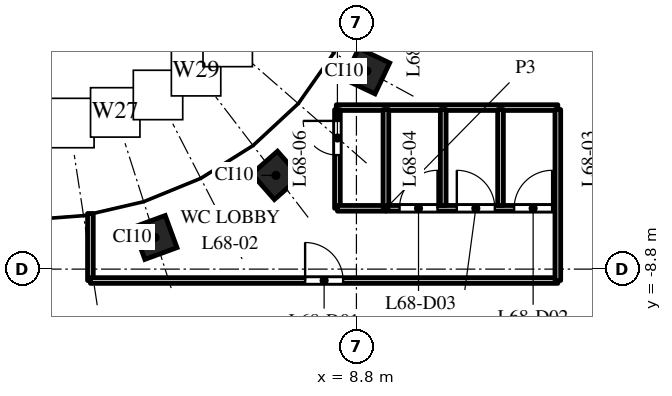
"""IFC4 building model, lengths in metres.
Left out: names, types, materials, properties, quantities, classifications, styles, units other than length and angle.
Written with IfcOpenShell. Run it as: python <this file> out.ifc"""

import sys

from ifc_helpers import new_model, si_unit, direction, frame, frame_2d, origin, origin_2d, place, context, subcontext, project, spatial, rectangle, extrude, element, fill, save


model = new_model("IFC4")
c1 = context("Model", 3, precision=1e-05, world=origin(), true_north=direction((0.0, 1.0)))
c2 = subcontext(c1, "Body", "Model", "MODEL_VIEW")
j1 = project(units=[si_unit("LENGTHUNIT", "METRE"), si_unit("PLANEANGLEUNIT", "RADIAN")], contexts=[c1])
p1 = place(None, origin())
s1 = spatial("IfcSite", under=j1, at=p1, CompositionType="ELEMENT")
p2 = place(p1, origin())
s2 = spatial("IfcBuilding", under=s1, at=p2, CompositionType="ELEMENT")
p3 = place(p2, frame((0.0, 0.0, 315.0)))
s3 = spatial("IfcBuildingStorey", under=s2, at=p3, CompositionType="ELEMENT", Elevation=315.0)
for number, where, z_axis, x_axis in (
    (1, (3.501, -7.967, 0.0), (0.0, 0.0, 1.0), (0.939, 0.344, 0.0)),
    (2, (6.682, -6.334, 0.0), (0.0, 0.0, 1.0), (0.751, 0.66, 0.0)),
    (3, (9.076, -3.588, 0.0), (0.0, 0.0, 1.0), (0.429, 0.903, 0.0)),
):
    element("IfcColumn", number, at=place(p3, frame(where, z_axis=z_axis, x_axis=x_axis)), inside=s3, PredefinedType="COLUMN", context=c2, shape_type="SweptSolid", body=[
        extrude(rectangle(XDim=0.9, YDim=0.9, at=origin_2d()), origin(), (0.0, 0.0, 1.0), 4.0),
    ])
p4 = place(p3, frame((1.8, -9.1, 0.0), z_axis=(0.0, 0.0, 1.0), x_axis=(0.0, 1.0, 0.0)))
e4 = element("IfcWall", 4, at=p4, inside=s3, PredefinedType="PARTITIONING", context=c2, shape_type="SweptSolid", body=[
    extrude(rectangle(XDim=1.764, YDim=0.15, at=frame_2d((0.882, 0.0))), origin(), (0.0, 0.0, 1.0), 3.0),
])
p5 = place(p3, frame((1.8, -9.1, 0.0), z_axis=(0.0, 0.0, 1.0), x_axis=(1.0, 0.0, 0.0)))
e5 = element("IfcWall", 5, at=p5, inside=s3, PredefinedType="PARTITIONING", context=c2, shape_type="SweptSolid", body=[
    extrude(rectangle(XDim=12.3, YDim=0.15, at=frame_2d((6.15, 0.0))), origin(), (0.0, 0.0, 1.0), 2.85),
])
p6 = place(p5, frame((5.65, 0.0, 0.0)))
e6 = element("IfcOpeningElement", 6, at=p6, cuts=e5, PredefinedType="OPENING", context=c2, shape_type="SweptSolid", body=[
    extrude(rectangle(XDim=1.0, YDim=2.1, at=frame_2d((0.5, 1.05))), frame((0.0, 0.085, 0.0), z_axis=(0.0, -1.0, 0.0), x_axis=(1.0, 0.0, 0.0)), (0.0, 0.0, 1.0), 0.17),
])
p7 = place(p3, frame((8.271, -4.55, 0.0), z_axis=(0.0, 0.0, 1.0), x_axis=(1.0, 0.0, 0.0)))
e7 = element("IfcWall", 7, at=p7, inside=s3, PredefinedType="PARTITIONING", context=c2, shape_type="SweptSolid", body=[
    extrude(rectangle(XDim=5.829, YDim=0.15, at=frame_2d((2.915, 0.0))), origin(), (0.0, 0.0, 1.0), 2.75),
])
p8 = place(p3, frame((8.3, -7.2, 0.0), z_axis=(0.0, 0.0, 1.0), x_axis=(0.0, 1.0, 0.0)))
e8 = element("IfcWall", 8, at=p8, inside=s3, PredefinedType="PARTITIONING", context=c2, shape_type="SweptSolid", body=[
    extrude(rectangle(XDim=2.596, YDim=0.15, at=frame_2d((1.298, 0.0))), origin(), (0.0, 0.0, 1.0), 3.7),
])
p9 = place(p8, frame((1.4, 0.0, 0.0)))
e9 = element("IfcOpeningElement", 9, at=p9, cuts=e8, PredefinedType="OPENING", context=c2, shape_type="SweptSolid", body=[
    extrude(rectangle(XDim=0.9, YDim=2.1, at=frame_2d((0.45, 1.05))), frame((0.0, 0.085, 0.0), z_axis=(0.0, -1.0, 0.0), x_axis=(1.0, 0.0, 0.0)), (0.0, 0.0, 1.0), 0.17),
])
p10 = place(p3, frame((8.3, -7.2, 0.0), z_axis=(0.0, 0.0, 1.0), x_axis=(1.0, 0.0, 0.0)))
e10 = element("IfcWall", 10, at=p10, inside=s3, PredefinedType="PARTITIONING", context=c2, shape_type="SweptSolid", body=[
    extrude(rectangle(XDim=1.276, YDim=0.15, at=frame_2d((0.638, 0.0))), origin(), (0.0, 0.0, 1.0), 3.7),
])
p11 = place(p3, frame((9.576, -7.2, 0.0), z_axis=(0.0, 0.0, 1.0), x_axis=(0.0, 1.0, 0.0)))
e11 = element("IfcWall", 11, at=p11, inside=s3, PredefinedType="PARTITIONING", context=c2, shape_type="SweptSolid", body=[
    extrude(rectangle(XDim=2.6, YDim=0.15, at=frame_2d((1.3, 0.0))), origin(), (0.0, 0.0, 1.0), 2.75),
])
p12 = place(p3, frame((9.576, -7.2, 0.0), z_axis=(0.0, 0.0, 1.0), x_axis=(1.0, 0.0, 0.0)))
e12 = element("IfcWall", 12, at=p12, inside=s3, PredefinedType="PARTITIONING", context=c2, shape_type="SweptSolid", body=[
    extrude(rectangle(XDim=4.449, YDim=0.15, at=frame_2d((2.225, 0.0))), origin(), (0.0, 0.0, 1.0), 2.75),
])
p13 = place(p12, frame((3.374, 0.0, 0.0)))
e13 = element("IfcOpeningElement", 13, at=p13, cuts=e12, PredefinedType="OPENING", context=c2, shape_type="SweptSolid", body=[
    extrude(rectangle(XDim=1.0, YDim=2.1, at=frame_2d((0.5, 1.05))), frame((0.0, 0.085, 0.0), z_axis=(0.0, -1.0, 0.0), x_axis=(1.0, 0.0, 0.0)), (0.0, 0.0, 1.0), 0.17),
])
p14 = place(p12, frame((1.866, 0.0, 0.0)))
e14 = element("IfcOpeningElement", 14, at=p14, cuts=e12, PredefinedType="OPENING", context=c2, shape_type="SweptSolid", body=[
    extrude(rectangle(XDim=1.0, YDim=2.1, at=frame_2d((0.5, 1.05))), frame((0.0, 0.085, 0.0), z_axis=(0.0, -1.0, 0.0), x_axis=(1.0, 0.0, 0.0)), (0.0, 0.0, 1.0), 0.17),
])
p15 = place(p12, frame((0.358, 0.0, 0.0)))
e15 = element("IfcOpeningElement", 15, at=p15, cuts=e12, PredefinedType="OPENING", context=c2, shape_type="SweptSolid", body=[
    extrude(rectangle(XDim=1.0, YDim=2.1, at=frame_2d((0.5, 1.05))), frame((0.0, 0.085, 0.0), z_axis=(0.0, -1.0, 0.0), x_axis=(1.0, 0.0, 0.0)), (0.0, 0.0, 1.0), 0.17),
])
for number, where, z_axis, x_axis in (
    (16, (11.084, -7.125, 0.0), (0.0, 0.0, 1.0), (0.0, 1.0, 0.0)),
    (17, (12.592, -7.125, 0.0), (0.0, 0.0, 1.0), (0.0, 1.0, 0.0)),
):
    element("IfcWall", number, at=place(p3, frame(where, z_axis=z_axis, x_axis=x_axis)), inside=s3, PredefinedType="PARTITIONING", context=c2, shape_type="SweptSolid", body=[
        extrude(rectangle(XDim=2.525, YDim=0.15, at=frame_2d((1.262, 0.0))), origin(), (0.0, 0.0, 1.0), 2.75),
    ])
p16 = place(p3, frame((14.1, -9.1, 0.0), z_axis=(0.0, 0.0, 1.0), x_axis=(0.0, 1.0, 0.0)))
e18 = element("IfcWall", 18, at=p16, inside=s3, PredefinedType="PARTITIONING", context=c2, shape_type="SweptSolid", body=[
    extrude(rectangle(XDim=4.5, YDim=0.15, at=frame_2d((2.25, 0.0))), origin(), (0.0, 0.0, 1.0), 2.75),
])
p17 = place(p6, origin())
e19 = element("IfcDoor", 19, at=p17, inside=s3, OperationType="SINGLE_SWING_LEFT", PredefinedType="DOOR", context=c2, shape_type="SweptSolid", body=[
    extrude(rectangle(XDim=1.0, YDim=2.1, at=frame_2d((0.5, 1.05))), frame((0.0, 0.025, 0.0), z_axis=(0.0, -1.0, 0.0), x_axis=(1.0, 0.0, 0.0)), (0.0, 0.0, 1.0), 0.05),
])
fill(e6, e19)
p18 = place(p13, origin())
e20 = element("IfcDoor", 20, at=p18, inside=s3, OperationType="SINGLE_SWING_RIGHT", PredefinedType="DOOR", context=c2, shape_type="SweptSolid", body=[
    extrude(rectangle(XDim=1.0, YDim=2.1, at=frame_2d((0.5, 1.05))), frame((0.0, 0.025, 0.0), z_axis=(0.0, -1.0, 0.0), x_axis=(1.0, 0.0, 0.0)), (0.0, 0.0, 1.0), 0.05),
])
fill(e13, e20)
p19 = place(p14, origin())
e21 = element("IfcDoor", 21, at=p19, inside=s3, OperationType="SINGLE_SWING_LEFT", PredefinedType="DOOR", context=c2, shape_type="SweptSolid", body=[
    extrude(rectangle(XDim=1.0, YDim=2.1, at=frame_2d((0.5, 1.05))), frame((0.0, 0.025, 0.0), z_axis=(0.0, -1.0, 0.0), x_axis=(1.0, 0.0, 0.0)), (0.0, 0.0, 1.0), 0.05),
])
fill(e14, e21)
p20 = place(p15, origin())
e22 = element("IfcDoor", 22, at=p20, inside=s3, OperationType="SINGLE_SWING_RIGHT", PredefinedType="DOOR", context=c2, shape_type="SweptSolid", body=[
    extrude(rectangle(XDim=1.0, YDim=2.1, at=frame_2d((0.5, 1.05))), frame((0.0, 0.025, 0.0), z_axis=(0.0, -1.0, 0.0), x_axis=(1.0, 0.0, 0.0)), (0.0, 0.0, 1.0), 0.05),
])
fill(e15, e22)
p21 = place(p9, origin())
e23 = element("IfcDoor", 23, at=p21, inside=s3, OperationType="SINGLE_SWING_RIGHT", PredefinedType="DOOR", context=c2, shape_type="SweptSolid", body=[
    extrude(rectangle(XDim=0.9, YDim=2.1, at=frame_2d((0.45, 1.05))), frame((0.0, 0.025, 0.0), z_axis=(0.0, -1.0, 0.0), x_axis=(1.0, 0.0, 0.0)), (0.0, 0.0, 1.0), 0.05),
])
fill(e9, e23)
save(model, sys.argv[1])
